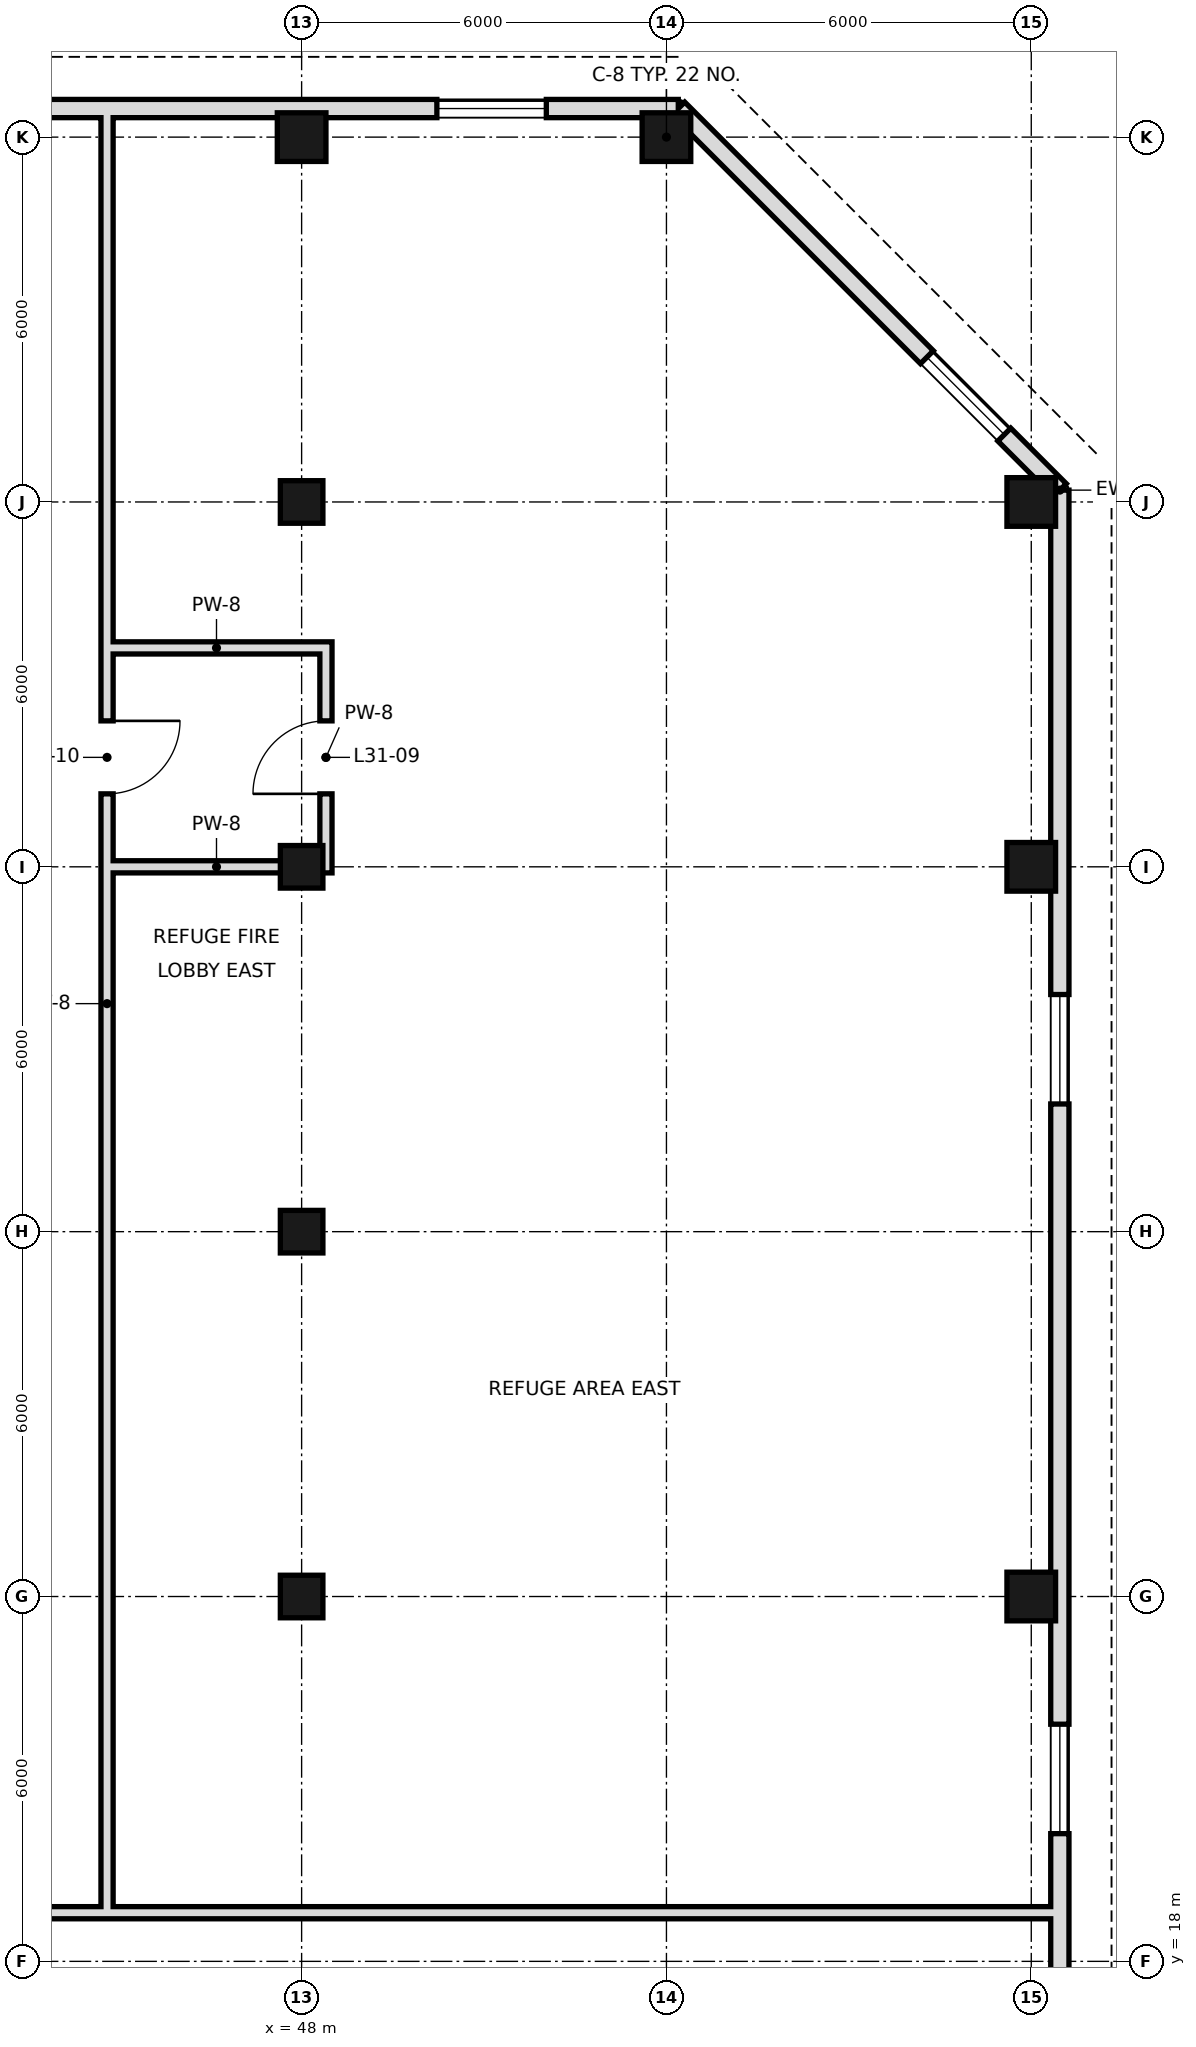
"""IFC4 building model, lengths in metres.
Left out: names, types, materials, properties, quantities, classifications, styles, units other than length and angle.
Written with IfcOpenShell. Run it as: python <this file> out.ifc"""

import sys

from ifc_helpers import new_model, si_unit, direction, frame, frame_2d, origin, origin_2d, place, context, subcontext, project, spatial, rectangle, hollow_rectangle, extrude, element, fill, save


model = new_model("IFC4")
c1 = context("Model", 3, precision=1e-05, world=origin(), true_north=direction((0.0, 1.0)))
c2 = subcontext(c1, "Body", "Model", "MODEL_VIEW")
j1 = project(units=[si_unit("LENGTHUNIT", "METRE"), si_unit("PLANEANGLEUNIT", "RADIAN")], contexts=[c1])
p1 = place(None, origin())
s1 = spatial("IfcSite", under=j1, at=p1, CompositionType="ELEMENT")
p2 = place(p1, origin())
s2 = spatial("IfcBuilding", under=s1, at=p2, CompositionType="ELEMENT")
p3 = place(p2, frame((0.0, 0.0, 138.4)))
s3 = spatial("IfcBuildingStorey", under=s2, at=p3, CompositionType="ELEMENT", Elevation=138.4)
for number, where, z_axis, x_axis in (
    (1, (48.0, 24.0, 0.0), (0.0, 0.0, 1.0), (1.0, 0.0, 0.0)),
    (2, (48.0, 30.0, 0.0), (0.0, 0.0, 1.0), (1.0, 0.0, 0.0)),
    (3, (48.0, 36.0, 0.0), (0.0, 0.0, 1.0), (1.0, 0.0, 0.0)),
    (4, (48.0, 42.0, 0.0), (0.0, 0.0, 1.0), (1.0, 0.0, 0.0)),
):
    element("IfcColumn", number, at=place(p3, frame(where, z_axis=z_axis, x_axis=x_axis)), inside=s3, PredefinedType="COLUMN", context=c2, shape_type="SweptSolid", body=[
        extrude(hollow_rectangle(XDim=0.7, YDim=0.7, WallThickness=0.036, at=origin_2d()), origin(), (0.0, 0.0, 1.0), 5.4),
    ])
for number, where, z_axis, x_axis in (
    (5, (48.0, 48.0, 0.0), (0.0, 0.0, 1.0), (1.0, 0.0, 0.0)),
    (6, (54.0, 48.0, 0.0), (0.0, 0.0, 1.0), (1.0, 0.0, 0.0)),
    (7, (60.0, 24.0, 0.0), (0.0, 0.0, 1.0), (1.0, 0.0, 0.0)),
    (8, (60.0, 36.0, 0.0), (0.0, 0.0, 1.0), (1.0, 0.0, 0.0)),
    (9, (60.0, 42.0, 0.0), (0.0, 0.0, 1.0), (1.0, 0.0, 0.0)),
):
    element("IfcColumn", number, at=place(p3, frame(where, z_axis=z_axis, x_axis=x_axis)), inside=s3, PredefinedType="COLUMN", context=c2, shape_type="SweptSolid", body=[
        extrude(hollow_rectangle(XDim=0.8, YDim=0.8, WallThickness=0.04, at=origin_2d()), origin(), (0.0, 0.0, 1.0), 5.4),
    ])
p4 = place(p3, frame((60.47, 5.805, 0.0), z_axis=(0.0, 0.0, 1.0), x_axis=(0.0, 1.0, 0.0)))
e10 = element("IfcWall", 10, at=p4, inside=s3, PredefinedType="SOLIDWALL", context=c2, shape_type="SweptSolid", body=[
    extrude(rectangle(XDim=36.389, YDim=0.3, at=frame_2d((18.195, 0.0))), origin(), (0.0, 0.0, 1.0), 5.22),
])
p5 = place(p4, frame((2.17, 0.0, 0.9)))
e11 = element("IfcOpeningElement", 11, at=p5, cuts=e10, PredefinedType="OPENING", context=c2, shape_type="SweptSolid", body=[
    extrude(rectangle(XDim=1.8, YDim=1.5, at=frame_2d((0.9, 0.75))), frame((0.0, 0.16, 0.0), z_axis=(0.0, -1.0, 0.0), x_axis=(1.0, 0.0, 0.0)), (0.0, 0.0, 1.0), 0.32),
])
p6 = place(p4, frame((14.295, 0.0, 0.9)))
e12 = element("IfcOpeningElement", 12, at=p6, cuts=e10, PredefinedType="OPENING", context=c2, shape_type="SweptSolid", body=[
    extrude(rectangle(XDim=1.8, YDim=1.5, at=frame_2d((0.9, 0.75))), frame((0.0, 0.16, 0.0), z_axis=(0.0, -1.0, 0.0), x_axis=(1.0, 0.0, 0.0)), (0.0, 0.0, 1.0), 0.32),
])
p7 = place(p4, frame((26.295, 0.0, 0.9)))
e13 = element("IfcOpeningElement", 13, at=p7, cuts=e10, PredefinedType="OPENING", context=c2, shape_type="SweptSolid", body=[
    extrude(rectangle(XDim=1.8, YDim=1.5, at=frame_2d((0.9, 0.75))), frame((0.0, 0.16, 0.0), z_axis=(0.0, -1.0, 0.0), x_axis=(1.0, 0.0, 0.0)), (0.0, 0.0, 1.0), 0.32),
])
p8 = place(p3, frame((60.47, 42.195, 0.0), z_axis=(0.0, 0.0, 1.0), x_axis=(-0.707106781187, 0.707106781187, 0.0)))
e14 = element("IfcWall", 14, at=p8, inside=s3, PredefinedType="SOLIDWALL", context=c2, shape_type="SweptSolid", body=[
    extrude(rectangle(XDim=8.875, YDim=0.3, at=frame_2d((4.438, 0.0))), origin(), (0.0, 0.0, 1.0), 5.22),
])
p9 = place(p8, frame((1.292, 0.0, 0.9)))
e15 = element("IfcOpeningElement", 15, at=p9, cuts=e14, PredefinedType="OPENING", context=c2, shape_type="SweptSolid", body=[
    extrude(rectangle(XDim=1.8, YDim=1.5, at=frame_2d((0.9, 0.75))), frame((0.0, 0.16, 0.0), z_axis=(0.0, -1.0, 0.0), x_axis=(1.0, 0.0, 0.0)), (0.0, 0.0, 1.0), 0.32),
])
p10 = place(p3, frame((54.195, 48.47, 0.0), z_axis=(0.0, 0.0, 1.0), x_axis=(-1.0, 0.0, 0.0)))
e16 = element("IfcWall", 16, at=p10, inside=s3, PredefinedType="SOLIDWALL", context=c2, shape_type="SweptSolid", body=[
    extrude(rectangle(XDim=54.389, YDim=0.3, at=frame_2d((27.195, 0.0))), origin(), (0.0, 0.0, 1.0), 5.22),
])
p11 = place(p10, frame((2.17, 0.0, 0.9)))
e17 = element("IfcOpeningElement", 17, at=p11, cuts=e16, PredefinedType="OPENING", context=c2, shape_type="SweptSolid", body=[
    extrude(rectangle(XDim=1.8, YDim=1.5, at=frame_2d((0.9, 0.75))), frame((0.0, 0.16, 0.0), z_axis=(0.0, -1.0, 0.0), x_axis=(1.0, 0.0, 0.0)), (0.0, 0.0, 1.0), 0.32),
])
p12 = place(p10, frame((14.295, 0.0, 0.9)))
e18 = element("IfcOpeningElement", 18, at=p12, cuts=e16, PredefinedType="OPENING", context=c2, shape_type="SweptSolid", body=[
    extrude(rectangle(XDim=1.8, YDim=1.5, at=frame_2d((0.9, 0.75))), frame((0.0, 0.16, 0.0), z_axis=(0.0, -1.0, 0.0), x_axis=(1.0, 0.0, 0.0)), (0.0, 0.0, 1.0), 0.32),
])
p13 = place(p10, frame((26.295, 0.0, 0.9)))
e19 = element("IfcOpeningElement", 19, at=p13, cuts=e16, PredefinedType="OPENING", context=c2, shape_type="SweptSolid", body=[
    extrude(rectangle(XDim=1.8, YDim=1.5, at=frame_2d((0.9, 0.75))), frame((0.0, 0.16, 0.0), z_axis=(0.0, -1.0, 0.0), x_axis=(1.0, 0.0, 0.0)), (0.0, 0.0, 1.0), 0.32),
])
p14 = place(p10, frame((38.295, 0.0, 0.9)))
e20 = element("IfcOpeningElement", 20, at=p14, cuts=e16, PredefinedType="OPENING", context=c2, shape_type="SweptSolid", body=[
    extrude(rectangle(XDim=1.8, YDim=1.5, at=frame_2d((0.9, 0.75))), frame((0.0, 0.16, 0.0), z_axis=(0.0, -1.0, 0.0), x_axis=(1.0, 0.0, 0.0)), (0.0, 0.0, 1.0), 0.32),
])
p15 = place(p10, frame((51.319, 0.0, 0.9)))
e21 = element("IfcOpeningElement", 21, at=p15, cuts=e16, PredefinedType="OPENING", context=c2, shape_type="SweptSolid", body=[
    extrude(rectangle(XDim=1.8, YDim=1.5, at=frame_2d((0.9, 0.75))), frame((0.0, 0.16, 0.0), z_axis=(0.0, -1.0, 0.0), x_axis=(1.0, 0.0, 0.0)), (0.0, 0.0, 1.0), 0.32),
])
p16 = place(p3, frame((44.8, 18.9, 0.0), z_axis=(0.0, 0.0, 1.0), x_axis=(0.0, 1.0, 0.0)))
e22 = element("IfcWall", 22, at=p16, inside=s3, PredefinedType="SOLIDWALL", context=c2, shape_type="SweptSolid", body=[
    extrude(rectangle(XDim=29.7, YDim=0.2, at=frame_2d((14.85, 0.0))), origin(), (0.0, 0.0, 1.0), 4.52),
])
p17 = place(p16, frame((18.3, 0.0, 0.0)))
e23 = element("IfcOpeningElement", 23, at=p17, cuts=e22, PredefinedType="OPENING", context=c2, shape_type="SweptSolid", body=[
    extrude(rectangle(XDim=1.2, YDim=2.4, at=frame_2d((0.6, 1.2))), frame((0.0, 0.11, 0.0), z_axis=(0.0, -1.0, 0.0), x_axis=(1.0, 0.0, 0.0)), (0.0, 0.0, 1.0), 0.22),
])
p18 = place(p3, frame((48.4, 35.9, 0.0), z_axis=(0.0, 0.0, 1.0), x_axis=(0.0, 1.0, 0.0)))
e24 = element("IfcWall", 24, at=p18, inside=s3, PredefinedType="SOLIDWALL", context=c2, shape_type="SweptSolid", body=[
    extrude(rectangle(XDim=3.8, YDim=0.2, at=frame_2d((1.9, 0.0))), origin(), (0.0, 0.0, 1.0), 5.22),
])
p19 = place(p18, frame((1.3, 0.0, 0.0)))
e25 = element("IfcOpeningElement", 25, at=p19, cuts=e24, PredefinedType="OPENING", context=c2, shape_type="SweptSolid", body=[
    extrude(rectangle(XDim=1.2, YDim=2.4, at=frame_2d((0.6, 1.2))), frame((0.0, 0.11, 0.0), z_axis=(0.0, -1.0, 0.0), x_axis=(1.0, 0.0, 0.0)), (0.0, 0.0, 1.0), 0.22),
])
p20 = place(p3, frame((-6.6, 18.8, 0.0), z_axis=(0.0, 0.0, 1.0), x_axis=(1.0, 0.0, 0.0)))
e26 = element("IfcWall", 26, at=p20, inside=s3, PredefinedType="SOLIDWALL", context=c2, shape_type="SweptSolid", body=[
    extrude(rectangle(XDim=67.2, YDim=0.2, at=frame_2d((33.6, 0.0))), origin(), (0.0, 0.0, 1.0), 4.52),
])
p21 = place(p20, frame((17.2, 0.0, 0.0)))
e27 = element("IfcOpeningElement", 27, at=p21, cuts=e26, PredefinedType="OPENING", context=c2, shape_type="SweptSolid", body=[
    extrude(rectangle(XDim=1.2, YDim=2.4, at=frame_2d((0.6, 1.2))), frame((0.0, 0.11, 0.0), z_axis=(0.0, -1.0, 0.0), x_axis=(1.0, 0.0, 0.0)), (0.0, 0.0, 1.0), 0.22),
])
p22 = place(p3, frame((44.9, 36.0, 0.0), z_axis=(0.0, 0.0, 1.0), x_axis=(1.0, 0.0, 0.0)))
e28 = element("IfcWall", 28, at=p22, inside=s3, PredefinedType="SOLIDWALL", context=c2, shape_type="SweptSolid", body=[
    extrude(rectangle(XDim=3.4, YDim=0.2, at=frame_2d((1.7, 0.0))), origin(), (0.0, 0.0, 1.0), 5.22),
])
p23 = place(p3, frame((44.9, 39.6, 0.0), z_axis=(0.0, 0.0, 1.0), x_axis=(1.0, 0.0, 0.0)))
e29 = element("IfcWall", 29, at=p23, inside=s3, PredefinedType="SOLIDWALL", context=c2, shape_type="SweptSolid", body=[
    extrude(rectangle(XDim=3.4, YDim=0.2, at=frame_2d((1.7, 0.0))), origin(), (0.0, 0.0, 1.0), 4.77),
])
p24 = place(p6, origin())
e30 = element("IfcWindow", 30, at=p24, inside=s3, PartitioningType="SINGLE_PANEL", PredefinedType="WINDOW", context=c2, shape_type="SweptSolid", body=[
    extrude(rectangle(XDim=1.8, YDim=1.5, at=frame_2d((0.9, 0.75))), frame((0.0, 0.03, 0.0), z_axis=(0.0, -1.0, 0.0), x_axis=(1.0, 0.0, 0.0)), (0.0, 0.0, 1.0), 0.06),
])
fill(e12, e30)
p25 = place(p7, origin())
e31 = element("IfcWindow", 31, at=p25, inside=s3, PartitioningType="SINGLE_PANEL", PredefinedType="WINDOW", context=c2, shape_type="SweptSolid", body=[
    extrude(rectangle(XDim=1.8, YDim=1.5, at=frame_2d((0.9, 0.75))), frame((0.0, 0.03, 0.0), z_axis=(0.0, -1.0, 0.0), x_axis=(1.0, 0.0, 0.0)), (0.0, 0.0, 1.0), 0.06),
])
fill(e13, e31)
p26 = place(p9, origin())
e32 = element("IfcWindow", 32, at=p26, inside=s3, PartitioningType="SINGLE_PANEL", PredefinedType="WINDOW", context=c2, shape_type="SweptSolid", body=[
    extrude(rectangle(XDim=1.8, YDim=1.5, at=frame_2d((0.9, 0.75))), frame((0.0, 0.03, 0.0), z_axis=(0.0, -1.0, 0.0), x_axis=(1.0, 0.0, 0.0)), (0.0, 0.0, 1.0), 0.06),
])
fill(e15, e32)
p27 = place(p11, origin())
e33 = element("IfcWindow", 33, at=p27, inside=s3, PartitioningType="SINGLE_PANEL", PredefinedType="WINDOW", context=c2, shape_type="SweptSolid", body=[
    extrude(rectangle(XDim=1.8, YDim=1.5, at=frame_2d((0.9, 0.75))), frame((0.0, 0.03, 0.0), z_axis=(0.0, -1.0, 0.0), x_axis=(1.0, 0.0, 0.0)), (0.0, 0.0, 1.0), 0.06),
])
fill(e17, e33)
p28 = place(p19, origin())
e34 = element("IfcDoor", 34, at=p28, inside=s3, OperationType="SINGLE_SWING_LEFT", PredefinedType="DOOR", context=c2, shape_type="SweptSolid", body=[
    extrude(rectangle(XDim=1.2, YDim=2.4, at=frame_2d((0.6, 1.2))), frame((0.0, 0.025, 0.0), z_axis=(0.0, -1.0, 0.0), x_axis=(1.0, 0.0, 0.0)), (0.0, 0.0, 1.0), 0.05),
])
fill(e25, e34)
p29 = place(p17, origin())
e35 = element("IfcDoor", 35, at=p29, inside=s3, OperationType="SINGLE_SWING_RIGHT", PredefinedType="DOOR", context=c2, shape_type="SweptSolid", body=[
    extrude(rectangle(XDim=1.2, YDim=2.4, at=frame_2d((0.6, 1.2))), frame((0.0, 0.025, 0.0), z_axis=(0.0, -1.0, 0.0), x_axis=(1.0, 0.0, 0.0)), (0.0, 0.0, 1.0), 0.05),
])
fill(e23, e35)
save(model, sys.argv[1])
